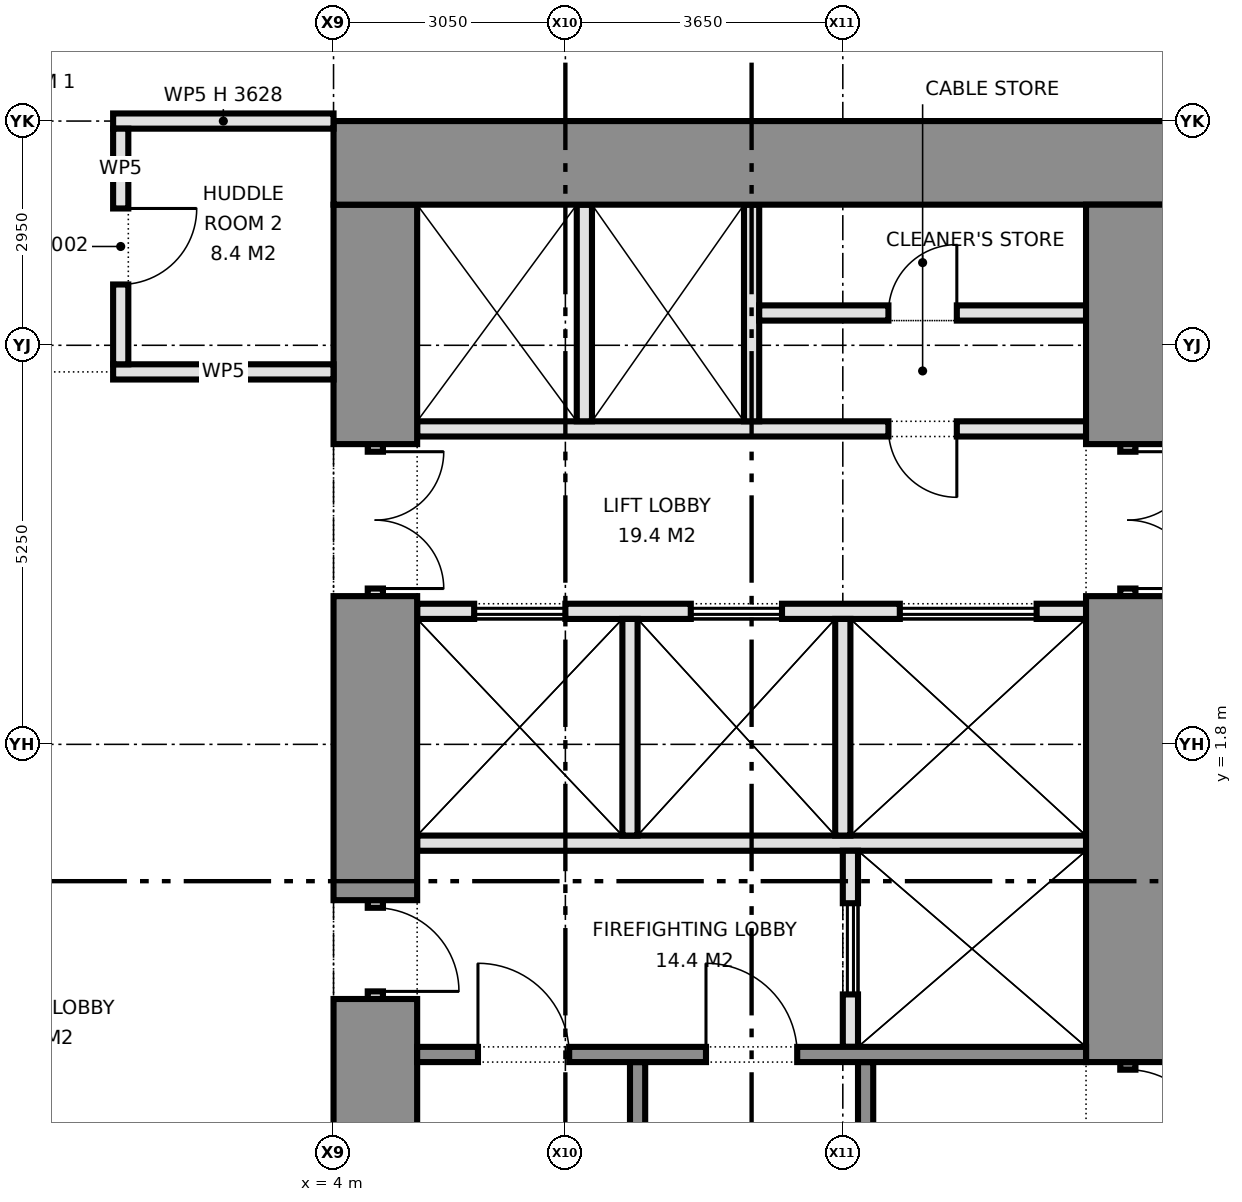
"""IFC4 building model, lengths in metres.
Left out: names, types, materials, properties, quantities, classifications, styles, units other than length and angle.
Written with IfcOpenShell. Run it as: python <this file> out.ifc"""

import sys

from ifc_helpers import new_model, si_unit, direction, frame, frame_2d, origin, place, context, subcontext, project, spatial, rectangle, extrude, element, fill, save


model = new_model("IFC4")
c1 = context("Model", 3, precision=1e-05, world=origin(), true_north=direction((0.0, 1.0)))
c2 = subcontext(c1, "Body", "Model", "MODEL_VIEW")
j1 = project(units=[si_unit("LENGTHUNIT", "METRE"), si_unit("PLANEANGLEUNIT", "RADIAN")], contexts=[c1])
p1 = place(None, origin())
s1 = spatial("IfcSite", under=j1, at=p1, CompositionType="ELEMENT")
p2 = place(p1, origin())
s2 = spatial("IfcBuilding", under=s1, at=p2, CompositionType="ELEMENT")
p3 = place(p2, frame((0.0, 0.0, 40.1)))
s3 = spatial("IfcBuildingStorey", under=s2, at=p3, CompositionType="ELEMENT", Elevation=40.1)
p4 = place(p3, frame((15.0, 9.45, 0.0), z_axis=(0.0, 0.0, 1.0), x_axis=(-1.0, 0.0, 0.0)))
e1 = element("IfcWall", 1, at=p4, inside=s3, PredefinedType="SHEAR", context=c2, shape_type="SweptSolid", body=[
    extrude(rectangle(XDim=11.0, YDim=1.1, at=frame_2d((5.5, 0.0))), origin(), (0.0, 0.0, 1.0), 4.575),
])
p5 = place(p3, frame((14.45, 8.9, 0.0), z_axis=(0.0, 0.0, 1.0), x_axis=(0.0, -1.0, 0.0)))
e2 = element("IfcWall", 2, at=p5, inside=s3, PredefinedType="SHEAR", context=c2, shape_type="SweptSolid", body=[
    extrude(rectangle(XDim=3.15, YDim=1.1, at=frame_2d((1.575, 0.0))), origin(), (0.0, 0.0, 1.0), 4.575),
])
p6 = place(p3, frame((14.45, 5.75, 0.0), z_axis=(0.0, 0.0, 1.0), x_axis=(0.0, -1.0, 0.0)))
e3 = element("IfcWall", 3, at=p6, inside=s3, PredefinedType="PARTITIONING", context=c2, shape_type="SweptSolid", body=[
    extrude(rectangle(XDim=2.0, YDim=0.2, at=frame_2d((1.0, 0.0))), origin(), (0.0, 0.0, 1.0), 2.4),
])
p7 = place(p6, frame((0.1, 0.0, 0.0)))
e4 = element("IfcOpeningElement", 4, at=p7, cuts=e3, PredefinedType="OPENING", context=c2, shape_type="SweptSolid", body=[
    extrude(rectangle(XDim=1.8, YDim=2.1, at=frame_2d((0.9, 1.05))), frame((0.0, 0.11, 0.0), z_axis=(0.0, -1.0, 0.0), x_axis=(1.0, 0.0, 0.0)), (0.0, 0.0, 1.0), 0.22),
])
p8 = place(p3, frame((14.45, 3.75, 0.0), z_axis=(0.0, 0.0, 1.0), x_axis=(0.0, -1.0, 0.0)))
e5 = element("IfcWall", 5, at=p8, inside=s3, PredefinedType="SHEAR", context=c2, shape_type="SweptSolid", body=[
    extrude(rectangle(XDim=6.13, YDim=1.1, at=frame_2d((3.065, 0.0))), origin(), (0.0, 0.0, 1.0), 4.575),
])
p9 = place(p3, frame((14.45, -2.38, 0.0), z_axis=(0.0, 0.0, 1.0), x_axis=(0.0, -1.0, 0.0)))
e6 = element("IfcWall", 6, at=p9, inside=s3, PredefinedType="SHEAR", context=c2, shape_type="SweptSolid", body=[
    extrude(rectangle(XDim=1.3, YDim=0.2, at=frame_2d((0.65, 0.0))), origin(), (0.0, 0.0, 1.0), 2.4),
])
p10 = place(p9, frame((0.1, 0.0, 0.0)))
e7 = element("IfcOpeningElement", 7, at=p10, cuts=e6, PredefinedType="OPENING", context=c2, shape_type="SweptSolid", body=[
    extrude(rectangle(XDim=1.1, YDim=2.1, at=frame_2d((0.55, 1.05))), frame((0.0, 0.11, 0.0), z_axis=(0.0, -1.0, 0.0), x_axis=(1.0, 0.0, 0.0)), (0.0, 0.0, 1.0), 0.22),
])
p11 = place(p3, frame((4.55, 8.9, 0.0), z_axis=(0.0, 0.0, 1.0), x_axis=(0.0, -1.0, 0.0)))
e8 = element("IfcWall", 8, at=p11, inside=s3, PredefinedType="SHEAR", context=c2, shape_type="SweptSolid", body=[
    extrude(rectangle(XDim=3.15, YDim=1.1, at=frame_2d((1.575, 0.0))), origin(), (0.0, 0.0, 1.0), 4.575),
])
p12 = place(p3, frame((4.55, 5.75, 0.0), z_axis=(0.0, 0.0, 1.0), x_axis=(0.0, -1.0, 0.0)))
e9 = element("IfcWall", 9, at=p12, inside=s3, PredefinedType="PARTITIONING", context=c2, shape_type="SweptSolid", body=[
    extrude(rectangle(XDim=2.0, YDim=0.2, at=frame_2d((1.0, 0.0))), origin(), (0.0, 0.0, 1.0), 2.4),
])
p13 = place(p12, frame((0.1, 0.0, 0.0)))
e10 = element("IfcOpeningElement", 10, at=p13, cuts=e9, PredefinedType="OPENING", context=c2, shape_type="SweptSolid", body=[
    extrude(rectangle(XDim=1.8, YDim=2.1, at=frame_2d((0.9, 1.05))), frame((0.0, 0.11, 0.0), z_axis=(0.0, -1.0, 0.0), x_axis=(1.0, 0.0, 0.0)), (0.0, 0.0, 1.0), 0.22),
])
p14 = place(p3, frame((4.55, 3.75, 0.0), z_axis=(0.0, 0.0, 1.0), x_axis=(0.0, -1.0, 0.0)))
e11 = element("IfcWall", 11, at=p14, inside=s3, PredefinedType="SHEAR", context=c2, shape_type="SweptSolid", body=[
    extrude(rectangle(XDim=4.0, YDim=1.1, at=frame_2d((2.0, 0.0))), origin(), (0.0, 0.0, 1.0), 4.575),
])
p15 = place(p3, frame((4.55, -0.25, 0.0), z_axis=(0.0, 0.0, 1.0), x_axis=(0.0, -1.0, 0.0)))
e12 = element("IfcWall", 12, at=p15, inside=s3, PredefinedType="PARTITIONING", context=c2, shape_type="SweptSolid", body=[
    extrude(rectangle(XDim=1.3, YDim=0.2, at=frame_2d((0.65, 0.0))), origin(), (0.0, 0.0, 1.0), 2.4),
])
p16 = place(p15, frame((0.1, 0.0, 0.0)))
e13 = element("IfcOpeningElement", 13, at=p16, cuts=e12, PredefinedType="OPENING", context=c2, shape_type="SweptSolid", body=[
    extrude(rectangle(XDim=1.1, YDim=2.1, at=frame_2d((0.55, 1.05))), frame((0.0, 0.11, 0.0), z_axis=(0.0, -1.0, 0.0), x_axis=(1.0, 0.0, 0.0)), (0.0, 0.0, 1.0), 0.22),
])
p17 = place(p3, frame((4.55, -1.55, 0.0), z_axis=(0.0, 0.0, 1.0), x_axis=(0.0, -1.0, 0.0)))
e14 = element("IfcWall", 14, at=p17, inside=s3, PredefinedType="SHEAR", context=c2, shape_type="SweptSolid", body=[
    extrude(rectangle(XDim=7.35, YDim=1.1, at=frame_2d((3.675, 0.0))), origin(), (0.0, 0.0, 1.0), 4.575),
])
p18 = place(p3, frame((13.9, 5.95, 0.0), z_axis=(0.0, 0.0, 1.0), x_axis=(-1.0, 0.0, 0.0)))
e15 = element("IfcWall", 15, at=p18, inside=s3, PredefinedType="PARTITIONING", context=c2, shape_type="SweptSolid", body=[
    extrude(rectangle(XDim=8.8, YDim=0.2, at=frame_2d((4.4, 0.0))), origin(), (0.0, 0.0, 1.0), 4.575),
])
p19 = place(p18, frame((1.7, 0.0, 0.0)))
e16 = element("IfcOpeningElement", 16, at=p19, cuts=e15, PredefinedType="OPENING", context=c2, shape_type="SweptSolid", body=[
    extrude(rectangle(XDim=0.9, YDim=2.1, at=frame_2d((0.45, 1.05))), frame((0.0, 0.11, 0.0), z_axis=(0.0, -1.0, 0.0), x_axis=(1.0, 0.0, 0.0)), (0.0, 0.0, 1.0), 0.22),
])
p20 = place(p3, frame((13.9, 3.55, 0.0), z_axis=(0.0, 0.0, 1.0), x_axis=(-1.0, 0.0, 0.0)))
e17 = element("IfcWall", 17, at=p20, inside=s3, PredefinedType="PARTITIONING", context=c2, shape_type="SweptSolid", body=[
    extrude(rectangle(XDim=8.8, YDim=0.2, at=frame_2d((4.4, 0.0))), origin(), (0.0, 0.0, 1.0), 4.575),
])
p21 = place(p20, frame((0.65, 0.0, 0.0)))
e18 = element("IfcOpeningElement", 18, at=p21, cuts=e17, PredefinedType="OPENING", context=c2, shape_type="SweptSolid", body=[
    extrude(rectangle(XDim=1.8, YDim=2.1, at=frame_2d((0.9, 1.05))), frame((0.0, 0.11, 0.0), z_axis=(0.0, -1.0, 0.0), x_axis=(1.0, 0.0, 0.0)), (0.0, 0.0, 1.0), 0.22),
])
p22 = place(p20, frame((4.0, 0.0, 0.0)))
e19 = element("IfcOpeningElement", 19, at=p22, cuts=e17, PredefinedType="OPENING", context=c2, shape_type="SweptSolid", body=[
    extrude(rectangle(XDim=1.2, YDim=2.1, at=frame_2d((0.6, 1.05))), frame((0.0, 0.11, 0.0), z_axis=(0.0, -1.0, 0.0), x_axis=(1.0, 0.0, 0.0)), (0.0, 0.0, 1.0), 0.22),
])
p23 = place(p20, frame((6.85, 0.0, 0.0)))
e20 = element("IfcOpeningElement", 20, at=p23, cuts=e17, PredefinedType="OPENING", context=c2, shape_type="SweptSolid", body=[
    extrude(rectangle(XDim=1.2, YDim=2.1, at=frame_2d((0.6, 1.05))), frame((0.0, 0.11, 0.0), z_axis=(0.0, -1.0, 0.0), x_axis=(1.0, 0.0, 0.0)), (0.0, 0.0, 1.0), 0.22),
])
p24 = place(p3, frame((13.9, 0.5, 0.0), z_axis=(0.0, 0.0, 1.0), x_axis=(-1.0, 0.0, 0.0)))
e21 = element("IfcWall", 21, at=p24, inside=s3, PredefinedType="PARTITIONING", context=c2, shape_type="SweptSolid", body=[
    extrude(rectangle(XDim=8.8, YDim=0.2, at=frame_2d((4.4, 0.0))), origin(), (0.0, 0.0, 1.0), 4.575),
])
p25 = place(p3, frame((10.8, 0.4, 0.0), z_axis=(0.0, 0.0, 1.0), x_axis=(0.0, -1.0, 0.0)))
e22 = element("IfcWall", 22, at=p25, inside=s3, PredefinedType="PARTITIONING", context=c2, shape_type="SweptSolid", body=[
    extrude(rectangle(XDim=2.58, YDim=0.2, at=frame_2d((1.29, 0.0))), origin(), (0.0, 0.0, 1.0), 4.575),
])
p26 = place(p25, frame((0.69, 0.0, 0.0)))
e23 = element("IfcOpeningElement", 23, at=p26, cuts=e22, PredefinedType="OPENING", context=c2, shape_type="SweptSolid", body=[
    extrude(rectangle(XDim=1.2, YDim=2.1, at=frame_2d((0.6, 1.05))), frame((0.0, 0.11, 0.0), z_axis=(0.0, -1.0, 0.0), x_axis=(1.0, 0.0, 0.0)), (0.0, 0.0, 1.0), 0.22),
])
p27 = place(p3, frame((13.9, -2.28, 0.0), z_axis=(0.0, 0.0, 1.0), x_axis=(-1.0, 0.0, 0.0)))
e24 = element("IfcWall", 24, at=p27, inside=s3, PredefinedType="SHEAR", context=c2, shape_type="SweptSolid", body=[
    extrude(rectangle(XDim=8.8, YDim=0.2, at=frame_2d((4.4, 0.0))), origin(), (0.0, 0.0, 1.0), 4.575),
])
p28 = place(p27, frame((3.8, 0.0, 0.0)))
e25 = element("IfcOpeningElement", 25, at=p28, cuts=e24, PredefinedType="OPENING", context=c2, shape_type="SweptSolid", body=[
    extrude(rectangle(XDim=1.2, YDim=2.1, at=frame_2d((0.6, 1.05))), frame((0.0, 0.11, 0.0), z_axis=(0.0, -1.0, 0.0), x_axis=(1.0, 0.0, 0.0)), (0.0, 0.0, 1.0), 0.22),
])
p29 = place(p27, frame((6.8, 0.0, 0.0)))
e26 = element("IfcOpeningElement", 26, at=p29, cuts=e24, PredefinedType="OPENING", context=c2, shape_type="SweptSolid", body=[
    extrude(rectangle(XDim=1.2, YDim=2.1, at=frame_2d((0.6, 1.05))), frame((0.0, 0.11, 0.0), z_axis=(0.0, -1.0, 0.0), x_axis=(1.0, 0.0, 0.0)), (0.0, 0.0, 1.0), 0.22),
])
for number, where, z_axis, x_axis in (
    (27, (11.0, -2.38, 0.0), (0.0, 0.0, 1.0), (0.0, -1.0, 0.0)),
    (28, (8.0, -2.38, 0.0), (0.0, 0.0, 1.0), (0.0, -1.0, 0.0)),
):
    element("IfcWall", number, at=place(p3, frame(where, z_axis=z_axis, x_axis=x_axis)), inside=s3, PredefinedType="SHEAR", context=c2, shape_type="SweptSolid", body=[
        extrude(rectangle(XDim=6.52, YDim=0.2, at=frame_2d((3.26, 0.0))), origin(), (0.0, 0.0, 1.0), 4.575),
    ])
for number, where, z_axis, x_axis in (
    (29, (9.5, 8.9, 0.0), (0.0, 0.0, 1.0), (0.0, -1.0, 0.0)),
    (30, (7.3, 8.9, 0.0), (0.0, 0.0, 1.0), (0.0, -1.0, 0.0)),
):
    element("IfcWall", number, at=place(p3, frame(where, z_axis=z_axis, x_axis=x_axis)), inside=s3, PredefinedType="PARTITIONING", context=c2, shape_type="SweptSolid", body=[
        extrude(rectangle(XDim=2.85, YDim=0.2, at=frame_2d((1.425, 0.0))), origin(), (0.0, 0.0, 1.0), 4.575),
    ])
p30 = place(p3, frame((13.9, 7.475, 0.0), z_axis=(0.0, 0.0, 1.0), x_axis=(-1.0, 0.0, 0.0)))
e31 = element("IfcWall", 31, at=p30, inside=s3, PredefinedType="PARTITIONING", context=c2, shape_type="SweptSolid", body=[
    extrude(rectangle(XDim=4.3, YDim=0.2, at=frame_2d((2.15, 0.0))), origin(), (0.0, 0.0, 1.0), 4.575),
])
p31 = place(p30, frame((1.7, 0.0, 0.0)))
e32 = element("IfcOpeningElement", 32, at=p31, cuts=e31, PredefinedType="OPENING", context=c2, shape_type="SweptSolid", body=[
    extrude(rectangle(XDim=0.9, YDim=2.1, at=frame_2d((0.45, 1.05))), frame((0.0, 0.11, 0.0), z_axis=(0.0, -1.0, 0.0), x_axis=(1.0, 0.0, 0.0)), (0.0, 0.0, 1.0), 0.22),
])
for number, where, z_axis, x_axis in (
    (33, (10.7, 3.45, 0.0), (0.0, 0.0, 1.0), (0.0, -1.0, 0.0)),
    (34, (7.9, 3.45, 0.0), (0.0, 0.0, 1.0), (0.0, -1.0, 0.0)),
):
    element("IfcWall", number, at=place(p3, frame(where, z_axis=z_axis, x_axis=x_axis)), inside=s3, PredefinedType="PARTITIONING", context=c2, shape_type="SweptSolid", body=[
        extrude(rectangle(XDim=2.85, YDim=0.2, at=frame_2d((1.425, 0.0))), origin(), (0.0, 0.0, 1.0), 4.575),
    ])
p32 = place(p3, frame((1.1, 6.7, 0.0), z_axis=(0.0, 0.0, 1.0), x_axis=(1.0, 0.0, 0.0)))
e35 = element("IfcWall", 35, at=p32, inside=s3, PredefinedType="PARTITIONING", context=c2, shape_type="SweptSolid", body=[
    extrude(rectangle(XDim=2.9, YDim=0.2, at=frame_2d((1.45, 0.0))), origin(), (0.0, 0.0, 1.0), 4.575),
])
p33 = place(p3, frame((1.1, 10.0, 0.0), z_axis=(0.0, 0.0, 1.0), x_axis=(1.0, 0.0, 0.0)))
e36 = element("IfcWall", 36, at=p33, inside=s3, PredefinedType="PARTITIONING", context=c2, shape_type="SweptSolid", body=[
    extrude(rectangle(XDim=2.9, YDim=0.2, at=frame_2d((1.45, 0.0))), origin(), (0.0, 0.0, 1.0), 3.627),
])
p34 = place(p3, frame((1.2, 6.8, 0.0), z_axis=(0.0, 0.0, 1.0), x_axis=(0.0, 1.0, 0.0)))
e37 = element("IfcWall", 37, at=p34, inside=s3, PredefinedType="PARTITIONING", context=c2, shape_type="SweptSolid", body=[
    extrude(rectangle(XDim=3.1, YDim=0.2, at=frame_2d((1.55, 0.0))), origin(), (0.0, 0.0, 1.0), 4.575),
])
p35 = place(p34, frame((1.05, 0.0, 0.0)))
e38 = element("IfcOpeningElement", 38, at=p35, cuts=e37, PredefinedType="OPENING", context=c2, shape_type="SweptSolid", body=[
    extrude(rectangle(XDim=1.0, YDim=2.1, at=frame_2d((0.5, 1.05))), frame((0.0, 0.11, 0.0), z_axis=(0.0, -1.0, 0.0), x_axis=(1.0, 0.0, 0.0)), (0.0, 0.0, 1.0), 0.22),
])
p36 = place(p7, origin())
e39 = element("IfcDoor", 39, at=p36, inside=s3, OperationType="DOUBLE_DOOR_SINGLE_SWING", PredefinedType="DOOR", context=c2, shape_type="SweptSolid", body=[
    extrude(rectangle(XDim=1.8, YDim=2.1, at=frame_2d((0.9, 1.05))), frame((0.0, 0.025, 0.0), z_axis=(0.0, -1.0, 0.0), x_axis=(1.0, 0.0, 0.0)), (0.0, 0.0, 1.0), 0.05),
])
fill(e4, e39)
p37 = place(p10, origin())
e40 = element("IfcDoor", 40, at=p37, inside=s3, OperationType="SINGLE_SWING_RIGHT", PredefinedType="DOOR", context=c2, shape_type="SweptSolid", body=[
    extrude(rectangle(XDim=1.1, YDim=2.1, at=frame_2d((0.55, 1.05))), frame((0.0, 0.025, 0.0), z_axis=(0.0, -1.0, 0.0), x_axis=(1.0, 0.0, 0.0)), (0.0, 0.0, 1.0), 0.05),
])
fill(e7, e40)
p38 = place(p13, origin())
e41 = element("IfcDoor", 41, at=p38, inside=s3, OperationType="DOUBLE_DOOR_SINGLE_SWING", PredefinedType="DOOR", context=c2, shape_type="SweptSolid", body=[
    extrude(rectangle(XDim=1.8, YDim=2.1, at=frame_2d((0.9, 1.05))), frame((0.0, 0.025, 0.0), z_axis=(0.0, -1.0, 0.0), x_axis=(1.0, 0.0, 0.0)), (0.0, 0.0, 1.0), 0.05),
])
fill(e10, e41)
p39 = place(p16, origin())
e42 = element("IfcDoor", 42, at=p39, inside=s3, OperationType="SINGLE_SWING_RIGHT", PredefinedType="DOOR", context=c2, shape_type="SweptSolid", body=[
    extrude(rectangle(XDim=1.1, YDim=2.1, at=frame_2d((0.55, 1.05))), frame((0.0, 0.025, 0.0), z_axis=(0.0, -1.0, 0.0), x_axis=(1.0, 0.0, 0.0)), (0.0, 0.0, 1.0), 0.05),
])
fill(e13, e42)
p40 = place(p21, origin())
e43 = element("IfcDoor", 43, at=p40, inside=s3, OperationType="DOUBLE_DOOR_SLIDING", PredefinedType="DOOR", context=c2, shape_type="SweptSolid", body=[
    extrude(rectangle(XDim=1.8, YDim=2.1, at=frame_2d((0.9, 1.05))), frame((0.0, 0.025, 0.0), z_axis=(0.0, -1.0, 0.0), x_axis=(1.0, 0.0, 0.0)), (0.0, 0.0, 1.0), 0.05),
])
fill(e18, e43)
p41 = place(p22, origin())
e44 = element("IfcDoor", 44, at=p41, inside=s3, OperationType="DOUBLE_DOOR_SLIDING", PredefinedType="DOOR", context=c2, shape_type="SweptSolid", body=[
    extrude(rectangle(XDim=1.2, YDim=2.1, at=frame_2d((0.6, 1.05))), frame((0.0, 0.025, 0.0), z_axis=(0.0, -1.0, 0.0), x_axis=(1.0, 0.0, 0.0)), (0.0, 0.0, 1.0), 0.05),
])
fill(e19, e44)
p42 = place(p23, origin())
e45 = element("IfcDoor", 45, at=p42, inside=s3, OperationType="DOUBLE_DOOR_SLIDING", PredefinedType="DOOR", context=c2, shape_type="SweptSolid", body=[
    extrude(rectangle(XDim=1.2, YDim=2.1, at=frame_2d((0.6, 1.05))), frame((0.0, 0.025, 0.0), z_axis=(0.0, -1.0, 0.0), x_axis=(1.0, 0.0, 0.0)), (0.0, 0.0, 1.0), 0.05),
])
fill(e20, e45)
p43 = place(p26, origin())
e46 = element("IfcDoor", 46, at=p43, inside=s3, OperationType="DOUBLE_DOOR_SLIDING", PredefinedType="DOOR", context=c2, shape_type="SweptSolid", body=[
    extrude(rectangle(XDim=1.2, YDim=2.1, at=frame_2d((0.6, 1.05))), frame((0.0, 0.025, 0.0), z_axis=(0.0, -1.0, 0.0), x_axis=(1.0, 0.0, 0.0)), (0.0, 0.0, 1.0), 0.05),
])
fill(e23, e46)
p44 = place(p19, origin())
e47 = element("IfcDoor", 47, at=p44, inside=s3, OperationType="SINGLE_SWING_LEFT", PredefinedType="DOOR", context=c2, shape_type="SweptSolid", body=[
    extrude(rectangle(XDim=0.9, YDim=2.1, at=frame_2d((0.45, 1.05))), frame((0.0, 0.025, 0.0), z_axis=(0.0, -1.0, 0.0), x_axis=(1.0, 0.0, 0.0)), (0.0, 0.0, 1.0), 0.05),
])
fill(e16, e47)
p45 = place(p31, frame((0.9, 0.0, 0.0), z_axis=(0.0, 0.0, 1.0), x_axis=(-1.0, 0.0, 0.0)))
e48 = element("IfcDoor", 48, at=p45, inside=s3, OperationType="SINGLE_SWING_RIGHT", PredefinedType="DOOR", context=c2, shape_type="SweptSolid", body=[
    extrude(rectangle(XDim=0.9, YDim=2.1, at=frame_2d((0.45, 1.05))), frame((0.0, 0.025, 0.0), z_axis=(0.0, -1.0, 0.0), x_axis=(1.0, 0.0, 0.0)), (0.0, 0.0, 1.0), 0.05),
])
fill(e32, e48)
p46 = place(p28, frame((1.2, 0.0, 0.0), z_axis=(0.0, 0.0, 1.0), x_axis=(-1.0, 0.0, 0.0)))
e49 = element("IfcDoor", 49, at=p46, inside=s3, OperationType="SINGLE_SWING_LEFT", PredefinedType="DOOR", context=c2, shape_type="SweptSolid", body=[
    extrude(rectangle(XDim=1.2, YDim=2.1, at=frame_2d((0.6, 1.05))), frame((0.0, 0.025, 0.0), z_axis=(0.0, -1.0, 0.0), x_axis=(1.0, 0.0, 0.0)), (0.0, 0.0, 1.0), 0.05),
])
fill(e25, e49)
p47 = place(p29, frame((1.2, 0.0, 0.0), z_axis=(0.0, 0.0, 1.0), x_axis=(-1.0, 0.0, 0.0)))
e50 = element("IfcDoor", 50, at=p47, inside=s3, OperationType="SINGLE_SWING_LEFT", PredefinedType="DOOR", context=c2, shape_type="SweptSolid", body=[
    extrude(rectangle(XDim=1.2, YDim=2.1, at=frame_2d((0.6, 1.05))), frame((0.0, 0.025, 0.0), z_axis=(0.0, -1.0, 0.0), x_axis=(1.0, 0.0, 0.0)), (0.0, 0.0, 1.0), 0.05),
])
fill(e26, e50)
p48 = place(p35, frame((1.0, 0.0, 0.0), z_axis=(0.0, 0.0, 1.0), x_axis=(-1.0, 0.0, 0.0)))
e51 = element("IfcDoor", 51, at=p48, inside=s3, OperationType="SINGLE_SWING_LEFT", PredefinedType="DOOR", context=c2, shape_type="SweptSolid", body=[
    extrude(rectangle(XDim=1.0, YDim=2.1, at=frame_2d((0.5, 1.05))), frame((0.0, 0.025, 0.0), z_axis=(0.0, -1.0, 0.0), x_axis=(1.0, 0.0, 0.0)), (0.0, 0.0, 1.0), 0.05),
])
fill(e38, e51)
save(model, sys.argv[1])
